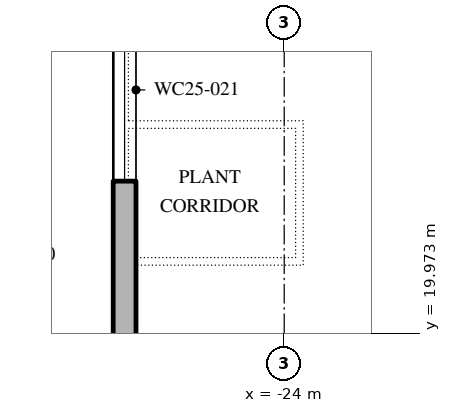
"""IFC4 building model, lengths in metres.
Left out: names, types, materials, properties, quantities, classifications, styles, units other than length and angle.
Written with IfcOpenShell. Run it as: python <this file> out.ifc"""

import sys

from ifc_helpers import new_model, si_unit, direction, frame, frame_2d, origin, place, context, subcontext, project, spatial, polyline, rectangle, outline, extrude, element, fill, save


model = new_model("IFC4")
c1 = context("Model", 3, precision=1e-05, world=origin(), true_north=direction((0.0, 1.0)))
c2 = subcontext(c1, "Body", "Model", "MODEL_VIEW")
j1 = project(units=[si_unit("LENGTHUNIT", "METRE"), si_unit("PLANEANGLEUNIT", "RADIAN")], contexts=[c1])
p1 = place(None, origin())
s1 = spatial("IfcSite", under=j1, at=p1, CompositionType="ELEMENT")
p2 = place(p1, origin())
s2 = spatial("IfcBuilding", under=s1, at=p2, CompositionType="ELEMENT")
p3 = place(p2, frame((0.0, 0.0, 377.4)))
s3 = spatial("IfcBuildingStorey", under=s2, at=p3, CompositionType="ELEMENT", Elevation=377.4)
p4 = place(p3, frame((-26.1, 25.501, 0.0), z_axis=(0.0, 0.0, 1.0), x_axis=(0.0, -1.0, 0.0)))
e1 = element("IfcWall", 1, at=p4, inside=s3, PredefinedType="STANDARD", context=c2, shape_type="SweptSolid", body=[
    extrude(rectangle(XDim=9.3, YDim=0.3, at=frame_2d((4.65, 0.0))), origin(), (0.0, 0.0, 1.0), 4.0),
])
p5 = place(p4, frame((1.125, 0.0, 0.8)))
e2 = element("IfcOpeningElement", 2, at=p5, cuts=e1, PredefinedType="OPENING", context=c2, shape_type="SweptSolid", body=[
    extrude(outline(polyline([(0.0, 0.0), (2.4, 0.0), (2.4, 1.25), (2.377, 1.488), (2.31, 1.717), (2.2, 1.929), (2.051, 2.116), (1.87, 2.272), (1.663, 2.391), (1.437, 2.468), (1.2, 2.5), (0.963, 2.468), (0.737, 2.391), (0.53, 2.272), (0.349, 2.116), (0.2, 1.929), (0.09, 1.717), (0.023, 1.488), (0.0, 1.25), (0.0, 0.0)])), frame((0.0, 0.16, 0.0), z_axis=(0.0, -1.0, 0.0), x_axis=(1.0, 0.0, 0.0)), (0.0, 0.0, 1.0), 0.32),
])
p6 = place(p4, frame((5.775, 0.0, 0.8)))
e3 = element("IfcOpeningElement", 3, at=p6, cuts=e1, PredefinedType="OPENING", context=c2, shape_type="SweptSolid", body=[
    extrude(outline(polyline([(0.0, 0.0), (2.4, 0.0), (2.4, 1.25), (2.377, 1.488), (2.31, 1.717), (2.2, 1.929), (2.051, 2.116), (1.87, 2.272), (1.663, 2.391), (1.437, 2.468), (1.2, 2.5), (0.963, 2.468), (0.737, 2.391), (0.53, 2.272), (0.349, 2.116), (0.2, 1.929), (0.09, 1.717), (0.023, 1.488), (0.0, 1.25), (0.0, 0.0)])), frame((0.0, 0.16, 0.0), z_axis=(0.0, -1.0, 0.0), x_axis=(1.0, 0.0, 0.0)), (0.0, 0.0, 1.0), 0.32),
])
p7 = place(p5, origin())
e4 = element("IfcWindow", 4, at=p7, inside=s3, PartitioningType="DOUBLE_PANEL_VERTICAL", PredefinedType="WINDOW", context=c2, shape_type="SweptSolid", body=[
    extrude(outline(polyline([(0.0, 0.0), (2.4, 0.0), (2.4, 1.25), (2.377, 1.488), (2.31, 1.717), (2.2, 1.929), (2.051, 2.116), (1.87, 2.272), (1.663, 2.391), (1.437, 2.468), (1.2, 2.5), (0.963, 2.468), (0.737, 2.391), (0.53, 2.272), (0.349, 2.116), (0.2, 1.929), (0.09, 1.717), (0.023, 1.488), (0.0, 1.25), (0.0, 0.0)])), frame((0.0, 0.03, 0.0), z_axis=(0.0, -1.0, 0.0), x_axis=(1.0, 0.0, 0.0)), (0.0, 0.0, 1.0), 0.06),
])
fill(e2, e4)
save(model, sys.argv[1])
